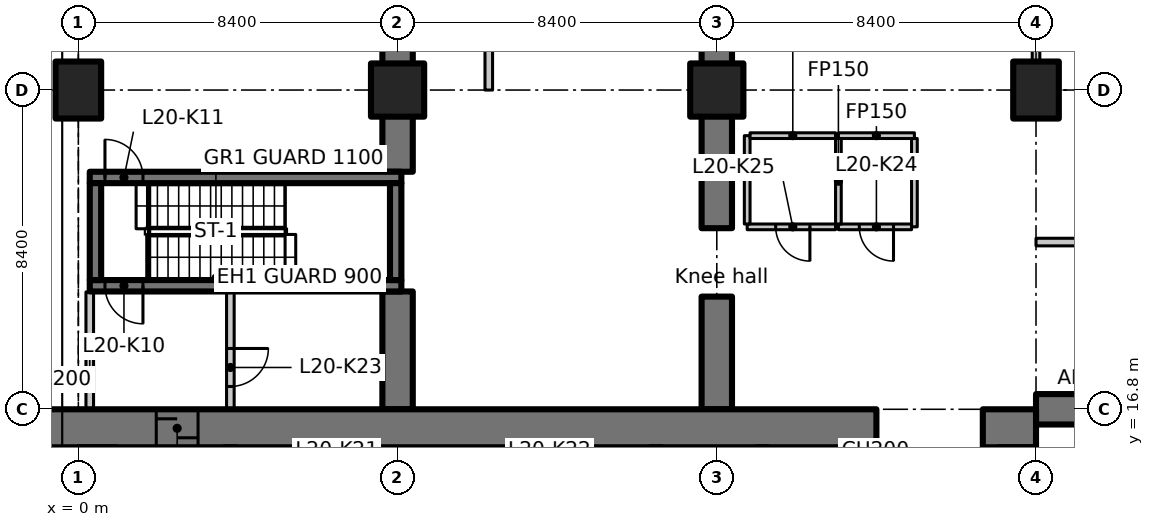
"""IFC4 building model, lengths in metres.
Left out: names, types, materials, properties, quantities, classifications, styles, units other than length and angle.
Written with IfcOpenShell. Run it as: python <this file> out.ifc"""

import sys

from ifc_helpers import new_model, si_unit, direction, frame, frame_2d, origin, origin_2d, place, context, subcontext, project, spatial, polyline, rectangle, outline, extrude, element, fill, save


model = new_model("IFC4")
c1 = context("Model", 3, precision=1e-05, world=origin(), true_north=direction((0.0, 1.0)))
c2 = subcontext(c1, "Body", "Model", "MODEL_VIEW")
j1 = project(units=[si_unit("LENGTHUNIT", "METRE"), si_unit("PLANEANGLEUNIT", "RADIAN")], contexts=[c1])
p1 = place(None, origin())
s1 = spatial("IfcSite", under=j1, at=p1, CompositionType="ELEMENT")
p2 = place(p1, origin())
s2 = spatial("IfcBuilding", under=s1, at=p2, CompositionType="ELEMENT")
p3 = place(p2, frame((0.0, 0.0, 86.9)))
s3 = spatial("IfcBuildingStorey", under=s2, at=p3, CompositionType="ELEMENT", Elevation=86.9)
p4 = place(p3, frame((0.0, 25.2, 0.0), z_axis=(0.0, 0.0, 1.0), x_axis=(1.0, 0.0, 0.0)))
e1 = element("IfcColumn", 1, at=p4, inside=s3, PredefinedType="COLUMN", context=c2, shape_type="SweptSolid", body=[
    extrude(rectangle(XDim=1.2, YDim=1.5, at=origin_2d()), origin(), (0.0, 0.0, 1.0), 4.55),
])
for number, where, z_axis, x_axis in (
    (2, (8.4, 25.2, 0.0), (0.0, 0.0, 1.0), (1.0, 0.0, 0.0)),
    (3, (16.8, 25.2, 0.0), (0.0, 0.0, 1.0), (1.0, 0.0, 0.0)),
):
    element("IfcColumn", number, at=place(p3, frame(where, z_axis=z_axis, x_axis=x_axis)), inside=s3, PredefinedType="COLUMN", context=c2, shape_type="SweptSolid", body=[
        extrude(rectangle(XDim=1.4, YDim=1.4, at=origin_2d()), origin(), (0.0, 0.0, 1.0), 4.55),
    ])
p5 = place(p3, frame((25.2, 25.2, 0.0), z_axis=(0.0, 0.0, 1.0), x_axis=(1.0, 0.0, 0.0)))
e4 = element("IfcColumn", 4, at=p5, inside=s3, PredefinedType="COLUMN", context=c2, shape_type="SweptSolid", body=[
    extrude(rectangle(XDim=1.2, YDim=1.5, at=origin_2d()), origin(), (0.0, 0.0, 1.0), 4.55),
])
p6 = place(p3, frame((25.2, 16.8, 0.0), z_axis=(0.0, 0.0, 1.0), x_axis=(1.0, 0.0, 0.0)))
e5 = element("IfcWall", 5, at=p6, inside=s3, PredefinedType="SHEAR", context=c2, shape_type="SweptSolid", body=[
    extrude(rectangle(XDim=2.965, YDim=0.8, at=frame_2d((1.482, 0.0))), origin(), (0.0, 0.0, 1.0), 4.55),
])
p7 = place(p3, frame((8.4, 16.8, 0.0), z_axis=(0.0, 0.0, 1.0), x_axis=(0.0, 1.0, 0.0)))
e6 = element("IfcWall", 6, at=p7, inside=s3, PredefinedType="SHEAR", context=c2, shape_type="SweptSolid", body=[
    extrude(rectangle(XDim=3.1, YDim=0.8, at=frame_2d((1.55, 0.0))), origin(), (0.0, 0.0, 1.0), 4.55),
])
p8 = place(p3, frame((8.4, 23.05, 0.0), z_axis=(0.0, 0.0, 1.0), x_axis=(0.0, 1.0, 0.0)))
e7 = element("IfcWall", 7, at=p8, inside=s3, PredefinedType="SHEAR", context=c2, shape_type="SweptSolid", body=[
    extrude(rectangle(XDim=1.48, YDim=0.8, at=frame_2d((0.74, 0.0))), origin(), (0.0, 0.0, 1.0), 4.55),
])
p9 = place(p3, frame((8.4, 25.87, 0.0), z_axis=(0.0, 0.0, 1.0), x_axis=(0.0, 1.0, 0.0)))
e8 = element("IfcWall", 8, at=p9, inside=s3, PredefinedType="SHEAR", context=c2, shape_type="SweptSolid", body=[
    extrude(rectangle(XDim=2.63, YDim=0.8, at=frame_2d((1.315, 0.0))), origin(), (0.0, 0.0, 1.0), 4.55),
])
p10 = place(p3, frame((16.8, 16.8, 0.0), z_axis=(0.0, 0.0, 1.0), x_axis=(0.0, 1.0, 0.0)))
e9 = element("IfcWall", 9, at=p10, inside=s3, PredefinedType="SHEAR", context=c2, shape_type="SweptSolid", body=[
    extrude(rectangle(XDim=2.965, YDim=0.8, at=frame_2d((1.482, 0.0))), origin(), (0.0, 0.0, 1.0), 4.55),
])
p11 = place(p3, frame((16.8, 21.565, 0.0), z_axis=(0.0, 0.0, 1.0), x_axis=(0.0, 1.0, 0.0)))
e10 = element("IfcWall", 10, at=p11, inside=s3, PredefinedType="SHEAR", context=c2, shape_type="SweptSolid", body=[
    extrude(rectangle(XDim=2.965, YDim=0.8, at=frame_2d((1.482, 0.0))), origin(), (0.0, 0.0, 1.0), 4.55),
])
p12 = place(p3, frame((16.8, 25.87, 0.0), z_axis=(0.0, 0.0, 1.0), x_axis=(0.0, 1.0, 0.0)))
e11 = element("IfcWall", 11, at=p12, inside=s3, PredefinedType="SHEAR", context=c2, shape_type="SweptSolid", body=[
    extrude(rectangle(XDim=1.33, YDim=0.8, at=frame_2d((0.665, 0.0))), origin(), (0.0, 0.0, 1.0), 4.55),
])
p13 = place(p3, frame((-1.1, 16.3, 0.0), z_axis=(0.0, 0.0, 1.0), x_axis=(1.0, 0.0, 0.0)))
e12 = element("IfcWall", 12, at=p13, inside=s3, PredefinedType="SHEAR", context=c2, shape_type="SweptSolid", body=[
    extrude(rectangle(XDim=22.1, YDim=1.0, at=frame_2d((11.05, 0.0))), origin(), (0.0, 0.0, 1.0), 4.55),
])
p14 = place(p13, frame((3.15, 0.0, 0.0)))
e13 = element("IfcOpeningElement", 13, at=p14, cuts=e12, PredefinedType="OPENING", context=c2, shape_type="SweptSolid", body=[
    extrude(rectangle(XDim=1.1, YDim=2.3, at=frame_2d((0.55, 1.15))), frame((0.0, 0.51, 0.0), z_axis=(0.0, -1.0, 0.0), x_axis=(1.0, 0.0, 0.0)), (0.0, 0.0, 1.0), 1.02),
])
p15 = place(p3, frame((23.8, 16.3, 0.0), z_axis=(0.0, 0.0, 1.0), x_axis=(1.0, 0.0, 0.0)))
e14 = element("IfcWall", 14, at=p15, inside=s3, PredefinedType="SHEAR", context=c2, shape_type="SweptSolid", body=[
    extrude(rectangle(XDim=1.4, YDim=1.0, at=frame_2d((0.7, 0.0))), origin(), (0.0, 0.0, 1.0), 4.55),
])
p16 = place(p3, frame((24.7, 12.6, 0.0), z_axis=(0.0, 0.0, 1.0), x_axis=(0.0, 1.0, 0.0)))
e15 = element("IfcWall", 15, at=p16, inside=s3, PredefinedType="SHEAR", context=c2, shape_type="SweptSolid", body=[
    extrude(rectangle(XDim=3.2, YDim=1.0, at=frame_2d((1.6, 0.0))), origin(), (0.0, 0.0, 1.0), 4.55),
])
p17 = place(p3, frame((8.5, 20.05, 0.0), z_axis=(0.0, 0.0, 1.0), x_axis=(-1.0, 0.0, 0.0)))
e16 = element("IfcWall", 16, at=p17, inside=s3, PredefinedType="SHEAR", context=c2, shape_type="SweptSolid", body=[
    extrude(rectangle(XDim=8.2, YDim=0.3, at=frame_2d((4.1, 0.0))), origin(), (0.0, 0.0, 1.0), 4.55),
])
p18 = place(p17, frame((6.8, 0.0, 0.0)))
e17 = element("IfcOpeningElement", 17, at=p18, cuts=e16, PredefinedType="OPENING", context=c2, shape_type="SweptSolid", body=[
    extrude(rectangle(XDim=1.0, YDim=2.1, at=frame_2d((0.5, 1.05))), frame((0.0, 0.16, 0.0), z_axis=(0.0, -1.0, 0.0), x_axis=(1.0, 0.0, 0.0)), (0.0, 0.0, 1.0), 0.32),
])
p19 = place(p3, frame((0.3, 22.9, 0.0), z_axis=(0.0, 0.0, 1.0), x_axis=(1.0, 0.0, 0.0)))
e18 = element("IfcWall", 18, at=p19, inside=s3, PredefinedType="SHEAR", context=c2, shape_type="SweptSolid", body=[
    extrude(rectangle(XDim=8.2, YDim=0.3, at=frame_2d((4.1, 0.0))), origin(), (0.0, 0.0, 1.0), 4.55),
])
p20 = place(p19, frame((0.4, 0.0, 0.0)))
e19 = element("IfcOpeningElement", 19, at=p20, cuts=e18, PredefinedType="OPENING", context=c2, shape_type="SweptSolid", body=[
    extrude(rectangle(XDim=1.0, YDim=2.1, at=frame_2d((0.5, 1.05))), frame((0.0, 0.16, 0.0), z_axis=(0.0, -1.0, 0.0), x_axis=(1.0, 0.0, 0.0)), (0.0, 0.0, 1.0), 0.32),
])
for number, where, z_axis, x_axis in (
    (20, (0.45, 20.2, 0.0), (0.0, 0.0, 1.0), (0.0, 1.0, 0.0)),
    (21, (8.35, 20.2, 0.0), (0.0, 0.0, 1.0), (0.0, 1.0, 0.0)),
):
    element("IfcWall", number, at=place(p3, frame(where, z_axis=z_axis, x_axis=x_axis)), inside=s3, PredefinedType="SHEAR", context=c2, shape_type="SweptSolid", body=[
        extrude(rectangle(XDim=2.55, YDim=0.3, at=frame_2d((1.275, 0.0))), origin(), (0.0, 0.0, 1.0), 4.55),
    ])
p21 = place(p3, frame((0.3, 16.812, 0.0), z_axis=(0.0, 0.0, 1.0), x_axis=(0.0, 1.0, 0.0)))
e22 = element("IfcWall", 22, at=p21, inside=s3, PredefinedType="PARTITIONING", context=c2, shape_type="SweptSolid", body=[
    extrude(rectangle(XDim=3.076, YDim=0.2, at=frame_2d((1.538, 0.0))), origin(), (0.0, 0.0, 1.0), 4.18),
])
p22 = place(p3, frame((4.0, 19.888, 0.0), z_axis=(0.0, 0.0, 1.0), x_axis=(0.0, -1.0, 0.0)))
e23 = element("IfcWall", 23, at=p22, inside=s3, PredefinedType="PARTITIONING", context=c2, shape_type="SweptSolid", body=[
    extrude(rectangle(XDim=3.076, YDim=0.2, at=frame_2d((1.538, 0.0))), origin(), (0.0, 0.0, 1.0), 4.55),
])
p23 = place(p22, frame((1.488, 0.0, 0.0)))
e24 = element("IfcOpeningElement", 24, at=p23, cuts=e23, PredefinedType="OPENING", context=c2, shape_type="SweptSolid", body=[
    extrude(rectangle(XDim=1.0, YDim=2.1, at=frame_2d((0.5, 1.05))), frame((0.0, 0.11, 0.0), z_axis=(0.0, -1.0, 0.0), x_axis=(1.0, 0.0, 0.0)), (0.0, 0.0, 1.0), 0.22),
])
p24 = place(p3, frame((20.0, 24.0, 0.0), z_axis=(0.0, 0.0, 1.0), x_axis=(1.0, 0.0, 0.0)))
e25 = element("IfcWall", 25, at=p24, inside=s3, PredefinedType="PARTITIONING", context=c2, shape_type="SweptSolid", body=[
    extrude(rectangle(XDim=2.0, YDim=0.15, at=frame_2d((1.0, 0.0))), origin(), (0.0, 0.0, 1.0), 4.55),
])
p25 = place(p3, frame((22.0, 23.925, 0.0), z_axis=(0.0, 0.0, 1.0), x_axis=(0.0, -1.0, 0.0)))
e26 = element("IfcWall", 26, at=p25, inside=s3, PredefinedType="PARTITIONING", context=c2, shape_type="SweptSolid", body=[
    extrude(rectangle(XDim=2.325, YDim=0.15, at=frame_2d((1.163, 0.0))), origin(), (0.0, 0.0, 1.0), 4.55),
])
p26 = place(p3, frame((21.925, 21.6, 0.0), z_axis=(0.0, 0.0, 1.0), x_axis=(-1.0, 0.0, 0.0)))
e27 = element("IfcWall", 27, at=p26, inside=s3, PredefinedType="PARTITIONING", context=c2, shape_type="SweptSolid", body=[
    extrude(rectangle(XDim=1.925, YDim=0.15, at=frame_2d((0.962, 0.0))), origin(), (0.0, 0.0, 1.0), 4.55),
])
p27 = place(p26, frame((0.475, 0.0, 0.0)))
e28 = element("IfcOpeningElement", 28, at=p27, cuts=e27, PredefinedType="OPENING", context=c2, shape_type="SweptSolid", body=[
    extrude(rectangle(XDim=0.9, YDim=2.1, at=frame_2d((0.45, 1.05))), frame((0.0, 0.085, 0.0), z_axis=(0.0, -1.0, 0.0), x_axis=(1.0, 0.0, 0.0)), (0.0, 0.0, 1.0), 0.17),
])
p28 = place(p3, frame((20.0, 21.675, 0.0), z_axis=(0.0, 0.0, 1.0), x_axis=(0.0, 1.0, 0.0)))
e29 = element("IfcWall", 29, at=p28, inside=s3, PredefinedType="PARTITIONING", context=c2, shape_type="SweptSolid", body=[
    extrude(rectangle(XDim=2.25, YDim=0.15, at=frame_2d((1.125, 0.0))), origin(), (0.0, 0.0, 1.0), 4.55),
])
p29 = place(p3, frame((19.925, 21.6, 0.0), z_axis=(0.0, 0.0, 1.0), x_axis=(-1.0, 0.0, 0.0)))
e30 = element("IfcWall", 30, at=p29, inside=s3, PredefinedType="PARTITIONING", context=c2, shape_type="SweptSolid", body=[
    extrude(rectangle(XDim=2.325, YDim=0.15, at=frame_2d((1.163, 0.0))), origin(), (0.0, 0.0, 1.0), 4.55),
])
p30 = place(p29, frame((0.675, 0.0, 0.0)))
e31 = element("IfcOpeningElement", 31, at=p30, cuts=e30, PredefinedType="OPENING", context=c2, shape_type="SweptSolid", body=[
    extrude(rectangle(XDim=0.9, YDim=2.1, at=frame_2d((0.45, 1.05))), frame((0.0, 0.085, 0.0), z_axis=(0.0, -1.0, 0.0), x_axis=(1.0, 0.0, 0.0)), (0.0, 0.0, 1.0), 0.17),
])
p31 = place(p3, frame((17.6, 21.675, 0.0), z_axis=(0.0, 0.0, 1.0), x_axis=(0.0, 1.0, 0.0)))
e32 = element("IfcWall", 32, at=p31, inside=s3, PredefinedType="PARTITIONING", context=c2, shape_type="SweptSolid", body=[
    extrude(rectangle(XDim=2.325, YDim=0.15, at=frame_2d((1.163, 0.0))), origin(), (0.0, 0.0, 1.0), 4.55),
])
p32 = place(p3, frame((17.675, 24.0, 0.0), z_axis=(0.0, 0.0, 1.0), x_axis=(1.0, 0.0, 0.0)))
e33 = element("IfcWall", 33, at=p32, inside=s3, PredefinedType="PARTITIONING", context=c2, shape_type="SweptSolid", body=[
    extrude(rectangle(XDim=2.25, YDim=0.15, at=frame_2d((1.125, 0.0))), origin(), (0.0, 0.0, 1.0), 4.55),
])
p33 = place(p3, frame((25.2, 21.2, 0.0), z_axis=(0.0, 0.0, 1.0), x_axis=(1.0, 0.0, 0.0)))
e34 = element("IfcWall", 34, at=p33, inside=s3, PredefinedType="PARTITIONING", context=c2, shape_type="SweptSolid", body=[
    extrude(rectangle(XDim=4.2, YDim=0.2, at=frame_2d((2.1, 0.0))), origin(), (0.0, 0.0, 1.0), 4.53),
])
p34 = place(p3, frame((25.2, 31.0, 0.0), z_axis=(0.0, 0.0, 1.0), x_axis=(0.0, -1.0, 0.0)))
e35 = element("IfcWall", 35, at=p34, inside=s3, PredefinedType="PARTITIONING", context=c2, shape_type="SweptSolid", body=[
    extrude(outline(polyline([(0.0, 0.0), (5.03, 0.0), (5.03, 4.18), (0.0, 4.18), (0.0, 0.0)])), frame((0.0, 0.1, 0.0), z_axis=(0.0, -1.0, 0.0), x_axis=(1.0, 0.0, 0.0)), (0.0, 0.0, 1.0), 0.2),
])
p35 = place(p34, frame((3.13, 0.0, 0.0)))
e36 = element("IfcOpeningElement", 36, at=p35, cuts=e35, PredefinedType="OPENING", context=c2, shape_type="SweptSolid", body=[
    extrude(rectangle(XDim=1.0, YDim=2.1, at=frame_2d((0.5, 1.05))), frame((0.0, 0.11, 0.0), z_axis=(0.0, -1.0, 0.0), x_axis=(1.0, 0.0, 0.0)), (0.0, 0.0, 1.0), 0.22),
])
p36 = place(p3, frame((10.8, 25.2, 0.0), z_axis=(0.0, 0.0, 1.0), x_axis=(0.0, 1.0, 0.0)))
e37 = element("IfcWall", 37, at=p36, inside=s3, PredefinedType="PARTITIONING", context=c2, shape_type="SweptSolid", body=[
    extrude(rectangle(XDim=4.2, YDim=0.2, at=frame_2d((2.1, 0.0))), origin(), (0.0, 0.0, 1.0), 4.53),
])
p37 = place(p36, frame((1.5, 0.0, 0.0)))
e38 = element("IfcOpeningElement", 38, at=p37, cuts=e37, PredefinedType="OPENING", context=c2, shape_type="SweptSolid", body=[
    extrude(rectangle(XDim=1.0, YDim=2.1, at=frame_2d((0.5, 1.05))), frame((0.0, 0.11, 0.0), z_axis=(0.0, -1.0, 0.0), x_axis=(1.0, 0.0, 0.0)), (0.0, 0.0, 1.0), 0.22),
])
p38 = place(p14, origin())
e39 = element("IfcDoor", 39, at=p38, inside=s3, OperationType="SLIDING_TO_LEFT", PredefinedType="DOOR", context=c2, shape_type="SweptSolid", body=[
    extrude(rectangle(XDim=1.1, YDim=2.3, at=frame_2d((0.55, 1.15))), frame((0.0, 0.025, 0.0), z_axis=(0.0, -1.0, 0.0), x_axis=(1.0, 0.0, 0.0)), (0.0, 0.0, 1.0), 0.05),
])
fill(e13, e39)
p39 = place(p18, origin())
e40 = element("IfcDoor", 40, at=p39, inside=s3, OperationType="SINGLE_SWING_RIGHT", PredefinedType="DOOR", context=c2, shape_type="SweptSolid", body=[
    extrude(rectangle(XDim=1.0, YDim=2.1, at=frame_2d((0.5, 1.05))), frame((0.0, 0.025, 0.0), z_axis=(0.0, -1.0, 0.0), x_axis=(1.0, 0.0, 0.0)), (0.0, 0.0, 1.0), 0.05),
])
fill(e17, e40)
p40 = place(p20, origin())
e41 = element("IfcDoor", 41, at=p40, inside=s3, OperationType="SINGLE_SWING_LEFT", PredefinedType="DOOR", context=c2, shape_type="SweptSolid", body=[
    extrude(rectangle(XDim=1.0, YDim=2.1, at=frame_2d((0.5, 1.05))), frame((0.0, 0.025, 0.0), z_axis=(0.0, -1.0, 0.0), x_axis=(1.0, 0.0, 0.0)), (0.0, 0.0, 1.0), 0.05),
])
fill(e19, e41)
p41 = place(p23, origin())
e42 = element("IfcDoor", 42, at=p41, inside=s3, OperationType="SINGLE_SWING_LEFT", PredefinedType="DOOR", context=c2, shape_type="SweptSolid", body=[
    extrude(rectangle(XDim=1.0, YDim=2.1, at=frame_2d((0.5, 1.05))), frame((0.0, 0.025, 0.0), z_axis=(0.0, -1.0, 0.0), x_axis=(1.0, 0.0, 0.0)), (0.0, 0.0, 1.0), 0.05),
])
fill(e24, e42)
p42 = place(p27, origin())
e43 = element("IfcDoor", 43, at=p42, inside=s3, OperationType="SINGLE_SWING_RIGHT", PredefinedType="DOOR", context=c2, shape_type="SweptSolid", body=[
    extrude(rectangle(XDim=0.9, YDim=2.1, at=frame_2d((0.45, 1.05))), frame((0.0, 0.025, 0.0), z_axis=(0.0, -1.0, 0.0), x_axis=(1.0, 0.0, 0.0)), (0.0, 0.0, 1.0), 0.05),
])
fill(e28, e43)
p43 = place(p30, origin())
e44 = element("IfcDoor", 44, at=p43, inside=s3, OperationType="SINGLE_SWING_LEFT", PredefinedType="DOOR", context=c2, shape_type="SweptSolid", body=[
    extrude(rectangle(XDim=0.9, YDim=2.1, at=frame_2d((0.45, 1.05))), frame((0.0, 0.025, 0.0), z_axis=(0.0, -1.0, 0.0), x_axis=(1.0, 0.0, 0.0)), (0.0, 0.0, 1.0), 0.05),
])
fill(e31, e44)
save(model, sys.argv[1])
